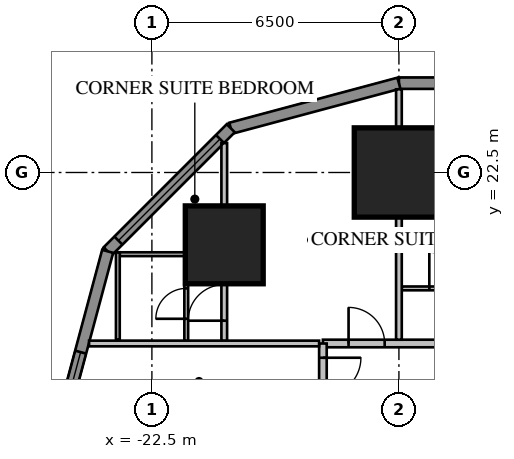
"""IFC4 building model, lengths in metres.
Left out: names, types, materials, properties, quantities, classifications, styles, units other than length and angle.
Written with IfcOpenShell. Run it as: python <this file> out.ifc"""

import sys

from ifc_helpers import new_model, si_unit, direction, frame, frame_2d, origin, origin_2d, place, context, subcontext, project, spatial, rectangle, extrude, element, fill, save


model = new_model("IFC4")
c1 = context("Model", 3, precision=1e-05, world=origin(), true_north=direction((0.0, 1.0)))
c2 = subcontext(c1, "Body", "Model", "MODEL_VIEW")
j1 = project(units=[si_unit("LENGTHUNIT", "METRE"), si_unit("PLANEANGLEUNIT", "RADIAN")], contexts=[c1])
p1 = place(None, origin())
s1 = spatial("IfcSite", under=j1, at=p1, CompositionType="ELEMENT")
p2 = place(p1, origin())
s2 = spatial("IfcBuilding", under=s1, at=p2, CompositionType="ELEMENT")
p3 = place(p2, frame((0.0, 0.0, 35.25)))
s3 = spatial("IfcBuildingStorey", under=s2, at=p3, CompositionType="ELEMENT", Elevation=35.25)
p4 = place(p3, frame((-16.0, 22.5, 0.0), z_axis=(0.0, 0.0, 1.0), x_axis=(1.0, 0.0, 0.0)))
e1 = element("IfcColumn", 1, at=p4, inside=s3, PredefinedType="COLUMN", context=c2, shape_type="SweptSolid", body=[
    extrude(rectangle(XDim=2.35, YDim=2.35, at=origin_2d()), origin(), (0.0, 0.0, 1.0), 3.85),
])
p5 = place(p3, frame((-20.596, 20.596, 0.0), z_axis=(0.0, 0.0, 1.0), x_axis=(1.0, 0.0, 0.0)))
e2 = element("IfcColumn", 2, at=p5, inside=s3, PredefinedType="COLUMN", context=c2, shape_type="SweptSolid", body=[
    extrude(rectangle(XDim=2.05, YDim=2.05, at=origin_2d()), origin(), (0.0, 0.0, 1.0), 3.85),
])
p6 = place(p3, frame((16.0, 24.85, 0.0), z_axis=(0.0, 0.0, 1.0), x_axis=(-1.0, 0.0, 0.0)))
e3 = element("IfcWall", 3, at=p6, inside=s3, PredefinedType="SOLIDWALL", context=c2, shape_type="SweptSolid", body=[
    extrude(rectangle(XDim=32.0, YDim=0.3, at=frame_2d((16.0, 0.0))), origin(), (0.0, 0.0, 1.0), 3.65),
])
p7 = place(p6, frame((1.2, 0.0, 0.75)))
e4 = element("IfcOpeningElement", 4, at=p7, cuts=e3, PredefinedType="OPENING", context=c2, shape_type="SweptSolid", body=[
    extrude(rectangle(XDim=1.6, YDim=1.8, at=frame_2d((0.8, 0.9))), frame((0.0, 0.17, 0.0), z_axis=(0.0, -1.0, 0.0), x_axis=(1.0, 0.0, 0.0)), (0.0, 0.0, 1.0), 0.34),
])
p8 = place(p6, frame((5.2, 0.0, 0.75)))
e5 = element("IfcOpeningElement", 5, at=p8, cuts=e3, PredefinedType="OPENING", context=c2, shape_type="SweptSolid", body=[
    extrude(rectangle(XDim=1.6, YDim=1.8, at=frame_2d((0.8, 0.9))), frame((0.0, 0.17, 0.0), z_axis=(0.0, -1.0, 0.0), x_axis=(1.0, 0.0, 0.0)), (0.0, 0.0, 1.0), 0.34),
])
p9 = place(p6, frame((17.2, 0.0, 0.75)))
e6 = element("IfcOpeningElement", 6, at=p9, cuts=e3, PredefinedType="OPENING", context=c2, shape_type="SweptSolid", body=[
    extrude(rectangle(XDim=1.6, YDim=1.8, at=frame_2d((0.8, 0.9))), frame((0.0, 0.17, 0.0), z_axis=(0.0, -1.0, 0.0), x_axis=(1.0, 0.0, 0.0)), (0.0, 0.0, 1.0), 0.34),
])
p10 = place(p6, frame((21.2, 0.0, 0.75)))
e7 = element("IfcOpeningElement", 7, at=p10, cuts=e3, PredefinedType="OPENING", context=c2, shape_type="SweptSolid", body=[
    extrude(rectangle(XDim=1.6, YDim=1.8, at=frame_2d((0.8, 0.9))), frame((0.0, 0.17, 0.0), z_axis=(0.0, -1.0, 0.0), x_axis=(1.0, 0.0, 0.0)), (0.0, 0.0, 1.0), 0.34),
])
p11 = place(p6, frame((25.2, 0.0, 0.75)))
e8 = element("IfcOpeningElement", 8, at=p11, cuts=e3, PredefinedType="OPENING", context=c2, shape_type="SweptSolid", body=[
    extrude(rectangle(XDim=1.6, YDim=1.8, at=frame_2d((0.8, 0.9))), frame((0.0, 0.17, 0.0), z_axis=(0.0, -1.0, 0.0), x_axis=(1.0, 0.0, 0.0)), (0.0, 0.0, 1.0), 0.34),
])
p12 = place(p6, frame((29.2, 0.0, 0.75)))
e9 = element("IfcOpeningElement", 9, at=p12, cuts=e3, PredefinedType="OPENING", context=c2, shape_type="SweptSolid", body=[
    extrude(rectangle(XDim=1.6, YDim=1.8, at=frame_2d((0.8, 0.9))), frame((0.0, 0.17, 0.0), z_axis=(0.0, -1.0, 0.0), x_axis=(1.0, 0.0, 0.0)), (0.0, 0.0, 1.0), 0.34),
])
p13 = place(p6, frame((8.8, 0.0, 0.75)))
e10 = element("IfcOpeningElement", 10, at=p13, cuts=e3, PredefinedType="OPENING", context=c2, shape_type="SweptSolid", body=[
    extrude(rectangle(XDim=2.4, YDim=1.8, at=frame_2d((1.2, 0.9))), frame((0.0, 0.17, 0.0), z_axis=(0.0, -1.0, 0.0), x_axis=(1.0, 0.0, 0.0)), (0.0, 0.0, 1.0), 0.34),
])
p14 = place(p6, frame((13.812, 0.0, 0.0)))
e11 = element("IfcOpeningElement", 11, at=p14, cuts=e3, PredefinedType="OPENING", context=c2, shape_type="SweptSolid", body=[
    extrude(rectangle(XDim=1.0, YDim=2.4, at=frame_2d((0.5, 1.2))), frame((0.0, 0.17, 0.0), z_axis=(0.0, -1.0, 0.0), x_axis=(1.0, 0.0, 0.0)), (0.0, 0.0, 1.0), 0.34),
])
p15 = place(p3, frame((-16.0, 24.85, 0.0), z_axis=(0.0, 0.0, 1.0), x_axis=(-0.965920218567, -0.258839972501, 0.0)))
e12 = element("IfcWall", 12, at=p15, inside=s3, PredefinedType="SOLIDWALL", context=c2, shape_type="SweptSolid", body=[
    extrude(rectangle(XDim=4.581, YDim=0.3, at=frame_2d((2.291, 0.0))), origin(), (0.0, 0.0, 1.0), 3.65),
])
p16 = place(p3, frame((-20.425, 23.664, 0.0), z_axis=(0.0, 0.0, 1.0), x_axis=(-0.707106781187, -0.707106781187, 0.0)))
e13 = element("IfcWall", 13, at=p16, inside=s3, PredefinedType="SOLIDWALL", context=c2, shape_type="SweptSolid", body=[
    extrude(rectangle(XDim=4.581, YDim=0.3, at=frame_2d((2.291, 0.0))), origin(), (0.0, 0.0, 1.0), 3.65),
])
p17 = place(p16, frame((0.4, 0.0, 0.75)))
e14 = element("IfcOpeningElement", 14, at=p17, cuts=e13, PredefinedType="OPENING", context=c2, shape_type="SweptSolid", body=[
    extrude(rectangle(XDim=3.781, YDim=1.8, at=frame_2d((1.891, 0.9))), frame((0.0, 0.17, 0.0), z_axis=(0.0, -1.0, 0.0), x_axis=(1.0, 0.0, 0.0)), (0.0, 0.0, 1.0), 0.34),
])
p18 = place(p3, frame((-23.664, 20.425, 0.0), z_axis=(0.0, 0.0, 1.0), x_axis=(-0.258839972501, -0.965920218567, 0.0)))
e15 = element("IfcWall", 15, at=p18, inside=s3, PredefinedType="SOLIDWALL", context=c2, shape_type="SweptSolid", body=[
    extrude(rectangle(XDim=4.581, YDim=0.3, at=frame_2d((2.291, 0.0))), origin(), (0.0, 0.0, 1.0), 3.65),
])
p19 = place(p18, frame((2.746, 0.0, 0.75)))
e16 = element("IfcOpeningElement", 16, at=p19, cuts=e15, PredefinedType="OPENING", context=c2, shape_type="SweptSolid", body=[
    extrude(rectangle(XDim=1.6, YDim=1.8, at=frame_2d((0.8, 0.9))), frame((0.0, 0.17, 0.0), z_axis=(0.0, -1.0, 0.0), x_axis=(1.0, 0.0, 0.0)), (0.0, 0.0, 1.0), 0.34),
])
p20 = place(p3, frame((18.0, 18.0, 0.0), z_axis=(0.0, 0.0, 1.0), x_axis=(-1.0, 0.0, 0.0)))
e17 = element("IfcWall", 17, at=p20, inside=s3, PredefinedType="PARTITIONING", context=c2, shape_type="SweptSolid", body=[
    extrude(rectangle(XDim=36.0, YDim=0.2, at=frame_2d((18.0, 0.0))), origin(), (0.0, 0.0, 1.0), 3.65),
])
p21 = place(p20, frame((10.4, 0.0, 0.0)))
e18 = element("IfcOpeningElement", 18, at=p21, cuts=e17, PredefinedType="OPENING", context=c2, shape_type="SweptSolid", body=[
    extrude(rectangle(XDim=1.0, YDim=2.1, at=frame_2d((0.5, 1.05))), frame((0.0, 0.12, 0.0), z_axis=(0.0, -1.0, 0.0), x_axis=(1.0, 0.0, 0.0)), (0.0, 0.0, 1.0), 0.24),
])
p22 = place(p20, frame((0.375, 0.0, 0.0)))
e19 = element("IfcOpeningElement", 19, at=p22, cuts=e17, PredefinedType="OPENING", context=c2, shape_type="SweptSolid", body=[
    extrude(rectangle(XDim=1.0, YDim=2.1, at=frame_2d((0.5, 1.05))), frame((0.0, 0.12, 0.0), z_axis=(0.0, -1.0, 0.0), x_axis=(1.0, 0.0, 0.0)), (0.0, 0.0, 1.0), 0.24),
])
p23 = place(p20, frame((34.375, 0.0, 0.0)))
e20 = element("IfcOpeningElement", 20, at=p23, cuts=e17, PredefinedType="OPENING", context=c2, shape_type="SweptSolid", body=[
    extrude(rectangle(XDim=0.95, YDim=2.1, at=frame_2d((0.475, 1.05))), frame((0.0, 0.12, 0.0), z_axis=(0.0, -1.0, 0.0), x_axis=(1.0, 0.0, 0.0)), (0.0, 0.0, 1.0), 0.24),
])
p24 = place(p3, frame((15.925, 19.45, 0.0), z_axis=(0.0, 0.0, 1.0), x_axis=(-1.0, 0.0, 0.0)))
e21 = element("IfcWall", 21, at=p24, inside=s3, PredefinedType="PARTITIONING", context=c2, shape_type="SweptSolid", body=[
    extrude(rectangle(XDim=31.85, YDim=0.1, at=frame_2d((15.925, 0.0))), origin(), (0.0, 0.0, 1.0), 3.65),
])
p25 = place(p24, frame((10.125, 0.0, 0.0)))
e22 = element("IfcOpeningElement", 22, at=p25, cuts=e21, PredefinedType="OPENING", context=c2, shape_type="SweptSolid", body=[
    extrude(rectangle(XDim=1.0, YDim=2.1, at=frame_2d((0.5, 1.05))), frame((0.0, 0.07, 0.0), z_axis=(0.0, -1.0, 0.0), x_axis=(1.0, 0.0, 0.0)), (0.0, 0.0, 1.0), 0.14),
])
p26 = place(p24, frame((8.3, 0.0, 0.0)))
e23 = element("IfcOpeningElement", 23, at=p26, cuts=e21, PredefinedType="OPENING", context=c2, shape_type="SweptSolid", body=[
    extrude(rectangle(XDim=0.8, YDim=2.1, at=frame_2d((0.4, 1.05))), frame((0.0, 0.07, 0.0), z_axis=(0.0, -1.0, 0.0), x_axis=(1.0, 0.0, 0.0)), (0.0, 0.0, 1.0), 0.14),
])
p27 = place(p24, frame((0.3, 0.0, 0.0)))
e24 = element("IfcOpeningElement", 24, at=p27, cuts=e21, PredefinedType="OPENING", context=c2, shape_type="SweptSolid", body=[
    extrude(rectangle(XDim=0.95, YDim=2.1, at=frame_2d((0.475, 1.05))), frame((0.0, 0.07, 0.0), z_axis=(0.0, -1.0, 0.0), x_axis=(1.0, 0.0, 0.0)), (0.0, 0.0, 1.0), 0.14),
])
p28 = place(p24, frame((6.175, 0.0, 0.0)))
e25 = element("IfcOpeningElement", 25, at=p28, cuts=e21, PredefinedType="OPENING", context=c2, shape_type="SweptSolid", body=[
    extrude(rectangle(XDim=0.95, YDim=2.1, at=frame_2d((0.475, 1.05))), frame((0.0, 0.07, 0.0), z_axis=(0.0, -1.0, 0.0), x_axis=(1.0, 0.0, 0.0)), (0.0, 0.0, 1.0), 0.14),
])
p29 = place(p24, frame((16.3, 0.0, 0.0)))
e26 = element("IfcOpeningElement", 26, at=p29, cuts=e21, PredefinedType="OPENING", context=c2, shape_type="SweptSolid", body=[
    extrude(rectangle(XDim=0.95, YDim=2.1, at=frame_2d((0.475, 1.05))), frame((0.0, 0.07, 0.0), z_axis=(0.0, -1.0, 0.0), x_axis=(1.0, 0.0, 0.0)), (0.0, 0.0, 1.0), 0.14),
])
p30 = place(p24, frame((22.175, 0.0, 0.0)))
e27 = element("IfcOpeningElement", 27, at=p30, cuts=e21, PredefinedType="OPENING", context=c2, shape_type="SweptSolid", body=[
    extrude(rectangle(XDim=0.95, YDim=2.1, at=frame_2d((0.475, 1.05))), frame((0.0, 0.07, 0.0), z_axis=(0.0, -1.0, 0.0), x_axis=(1.0, 0.0, 0.0)), (0.0, 0.0, 1.0), 0.14),
])
p31 = place(p24, frame((24.3, 0.0, 0.0)))
e28 = element("IfcOpeningElement", 28, at=p31, cuts=e21, PredefinedType="OPENING", context=c2, shape_type="SweptSolid", body=[
    extrude(rectangle(XDim=0.95, YDim=2.1, at=frame_2d((0.475, 1.05))), frame((0.0, 0.07, 0.0), z_axis=(0.0, -1.0, 0.0), x_axis=(1.0, 0.0, 0.0)), (0.0, 0.0, 1.0), 0.14),
])
p32 = place(p24, frame((30.175, 0.0, 0.0)))
e29 = element("IfcOpeningElement", 29, at=p32, cuts=e21, PredefinedType="OPENING", context=c2, shape_type="SweptSolid", body=[
    extrude(rectangle(XDim=0.95, YDim=2.1, at=frame_2d((0.475, 1.05))), frame((0.0, 0.07, 0.0), z_axis=(0.0, -1.0, 0.0), x_axis=(1.0, 0.0, 0.0)), (0.0, 0.0, 1.0), 0.14),
])
p33 = place(p3, frame((-16.0, 18.1, 0.0), z_axis=(0.0, 0.0, 1.0), x_axis=(0.0, 1.0, 0.0)))
e30 = element("IfcWall", 30, at=p33, inside=s3, PredefinedType="PARTITIONING", context=c2, shape_type="SweptSolid", body=[
    extrude(rectangle(XDim=6.589, YDim=0.15, at=frame_2d((3.295, 0.0))), origin(), (0.0, 0.0, 1.0), 3.65),
])
p34 = place(p3, frame((-21.596, 18.065, 0.0), z_axis=(0.0, 0.0, 1.0), x_axis=(0.0, 1.0, 0.0)))
e31 = element("IfcWall", 31, at=p34, inside=s3, PredefinedType="PARTITIONING", context=c2, shape_type="SweptSolid", body=[
    extrude(rectangle(XDim=2.335, YDim=0.1, at=frame_2d((1.167, 0.0))), origin(), (0.0, 0.0, 1.0), 3.65),
])
p35 = place(p34, frame((0.585, 0.0, 0.0)))
e32 = element("IfcOpeningElement", 32, at=p35, cuts=e31, PredefinedType="OPENING", context=c2, shape_type="SweptSolid", body=[
    extrude(rectangle(XDim=0.8, YDim=2.1, at=frame_2d((0.4, 1.05))), frame((0.0, 0.07, 0.0), z_axis=(0.0, -1.0, 0.0), x_axis=(1.0, 0.0, 0.0)), (0.0, 0.0, 1.0), 0.14),
])
p36 = place(p3, frame((-21.646, 20.35, 0.0), z_axis=(0.0, 0.0, 1.0), x_axis=(-1.0, 0.0, 0.0)))
e33 = element("IfcWall", 33, at=p36, inside=s3, PredefinedType="PARTITIONING", context=c2, shape_type="SweptSolid", body=[
    extrude(rectangle(XDim=1.7, YDim=0.1, at=frame_2d((0.85, 0.0))), origin(), (0.0, 0.0, 1.0), 3.65),
])
p37 = place(p3, frame((-23.396, 18.1, 0.0), z_axis=(0.0, 0.0, 1.0), x_axis=(0.0, 1.0, 0.0)))
e34 = element("IfcWall", 34, at=p37, inside=s3, PredefinedType="PARTITIONING", context=c2, shape_type="SweptSolid", body=[
    extrude(rectangle(XDim=2.3, YDim=0.1, at=frame_2d((1.15, 0.0))), origin(), (0.0, 0.0, 1.0), 3.65),
])
p38 = place(p3, frame((-20.596, 18.065, 0.0), z_axis=(0.0, 0.0, 1.0), x_axis=(0.0, 1.0, 0.0)))
e35 = element("IfcWall", 35, at=p38, inside=s3, PredefinedType="PARTITIONING", context=c2, shape_type="SweptSolid", body=[
    extrude(rectangle(XDim=5.209, YDim=0.15, at=frame_2d((2.604, 0.0))), origin(), (0.0, 0.0, 1.0), 3.65),
])
p39 = place(p38, frame((0.535, 0.0, 0.0)))
e36 = element("IfcOpeningElement", 36, at=p39, cuts=e35, PredefinedType="OPENING", context=c2, shape_type="SweptSolid", body=[
    extrude(rectangle(XDim=0.95, YDim=2.1, at=frame_2d((0.475, 1.05))), frame((0.0, 0.095, 0.0), z_axis=(0.0, -1.0, 0.0), x_axis=(1.0, 0.0, 0.0)), (0.0, 0.0, 1.0), 0.19),
])
p40 = place(p3, frame((-18.0, 18.0, 0.0), z_axis=(0.0, 0.0, 1.0), x_axis=(0.0, -1.0, 0.0)))
e37 = element("IfcWall", 37, at=p40, inside=s3, PredefinedType="PARTITIONING", context=c2, shape_type="SweptSolid", body=[
    extrude(rectangle(XDim=36.0, YDim=0.2, at=frame_2d((18.0, 0.0))), origin(), (0.0, 0.0, 1.0), 3.65),
])
p41 = place(p40, frame((10.4, 0.0, 0.0)))
e38 = element("IfcOpeningElement", 38, at=p41, cuts=e37, PredefinedType="OPENING", context=c2, shape_type="SweptSolid", body=[
    extrude(rectangle(XDim=1.0, YDim=2.1, at=frame_2d((0.5, 1.05))), frame((0.0, 0.12, 0.0), z_axis=(0.0, -1.0, 0.0), x_axis=(1.0, 0.0, 0.0)), (0.0, 0.0, 1.0), 0.24),
])
p42 = place(p40, frame((0.375, 0.0, 0.0)))
e39 = element("IfcOpeningElement", 39, at=p42, cuts=e37, PredefinedType="OPENING", context=c2, shape_type="SweptSolid", body=[
    extrude(rectangle(XDim=1.0, YDim=2.1, at=frame_2d((0.5, 1.05))), frame((0.0, 0.12, 0.0), z_axis=(0.0, -1.0, 0.0), x_axis=(1.0, 0.0, 0.0)), (0.0, 0.0, 1.0), 0.24),
])
p43 = place(p40, frame((34.375, 0.0, 0.0)))
e40 = element("IfcOpeningElement", 40, at=p43, cuts=e37, PredefinedType="OPENING", context=c2, shape_type="SweptSolid", body=[
    extrude(rectangle(XDim=0.95, YDim=2.1, at=frame_2d((0.475, 1.05))), frame((0.0, 0.12, 0.0), z_axis=(0.0, -1.0, 0.0), x_axis=(1.0, 0.0, 0.0)), (0.0, 0.0, 1.0), 0.24),
])
p44 = place(p3, frame((-18.1, 18.0, 0.0), z_axis=(0.0, 0.0, 1.0), x_axis=(-1.0, 0.0, 0.0)))
e41 = element("IfcWall", 41, at=p44, inside=s3, PredefinedType="PARTITIONING", context=c2, shape_type="SweptSolid", body=[
    extrude(rectangle(XDim=6.053, YDim=0.15, at=frame_2d((3.027, 0.0))), origin(), (0.0, 0.0, 1.0), 3.65),
])
p45 = place(p17, origin())
e42 = element("IfcWindow", 42, at=p45, inside=s3, PartitioningType="SINGLE_PANEL", PredefinedType="WINDOW", context=c2, shape_type="SweptSolid", body=[
    extrude(rectangle(XDim=3.781, YDim=1.8, at=frame_2d((1.891, 0.9))), frame((0.0, 0.03, 0.0), z_axis=(0.0, -1.0, 0.0), x_axis=(1.0, 0.0, 0.0)), (0.0, 0.0, 1.0), 0.06),
])
fill(e14, e42)
p46 = place(p19, origin())
e43 = element("IfcWindow", 43, at=p46, inside=s3, PartitioningType="SINGLE_PANEL", PredefinedType="WINDOW", context=c2, shape_type="SweptSolid", body=[
    extrude(rectangle(XDim=1.6, YDim=1.8, at=frame_2d((0.8, 0.9))), frame((0.0, 0.03, 0.0), z_axis=(0.0, -1.0, 0.0), x_axis=(1.0, 0.0, 0.0)), (0.0, 0.0, 1.0), 0.06),
])
fill(e16, e43)
p47 = place(p32, origin())
e44 = element("IfcDoor", 44, at=p47, inside=s3, OperationType="SINGLE_SWING_RIGHT", PredefinedType="DOOR", context=c2, shape_type="SweptSolid", body=[
    extrude(rectangle(XDim=0.95, YDim=2.1, at=frame_2d((0.475, 1.05))), frame((0.0, 0.025, 0.0), z_axis=(0.0, -1.0, 0.0), x_axis=(1.0, 0.0, 0.0)), (0.0, 0.0, 1.0), 0.05),
])
fill(e29, e44)
p48 = place(p23, origin())
e45 = element("IfcDoor", 45, at=p48, inside=s3, OperationType="SINGLE_SWING_RIGHT", PredefinedType="DOOR", context=c2, shape_type="SweptSolid", body=[
    extrude(rectangle(XDim=0.95, YDim=2.1, at=frame_2d((0.475, 1.05))), frame((0.0, 0.025, 0.0), z_axis=(0.0, -1.0, 0.0), x_axis=(1.0, 0.0, 0.0)), (0.0, 0.0, 1.0), 0.05),
])
fill(e20, e45)
p49 = place(p35, origin())
e46 = element("IfcDoor", 46, at=p49, inside=s3, OperationType="SINGLE_SWING_LEFT", PredefinedType="DOOR", context=c2, shape_type="SweptSolid", body=[
    extrude(rectangle(XDim=0.8, YDim=2.1, at=frame_2d((0.4, 1.05))), frame((0.0, 0.025, 0.0), z_axis=(0.0, -1.0, 0.0), x_axis=(1.0, 0.0, 0.0)), (0.0, 0.0, 1.0), 0.05),
])
fill(e32, e46)
p50 = place(p39, origin())
e47 = element("IfcDoor", 47, at=p50, inside=s3, OperationType="SINGLE_SWING_LEFT", PredefinedType="DOOR", context=c2, shape_type="SweptSolid", body=[
    extrude(rectangle(XDim=0.95, YDim=2.1, at=frame_2d((0.475, 1.05))), frame((0.0, 0.025, 0.0), z_axis=(0.0, -1.0, 0.0), x_axis=(1.0, 0.0, 0.0)), (0.0, 0.0, 1.0), 0.05),
])
fill(e36, e47)
p51 = place(p42, origin())
e48 = element("IfcDoor", 48, at=p51, inside=s3, OperationType="SINGLE_SWING_LEFT", PredefinedType="DOOR", context=c2, shape_type="SweptSolid", body=[
    extrude(rectangle(XDim=1.0, YDim=2.1, at=frame_2d((0.5, 1.05))), frame((0.0, 0.025, 0.0), z_axis=(0.0, -1.0, 0.0), x_axis=(1.0, 0.0, 0.0)), (0.0, 0.0, 1.0), 0.05),
])
fill(e39, e48)
save(model, sys.argv[1])
